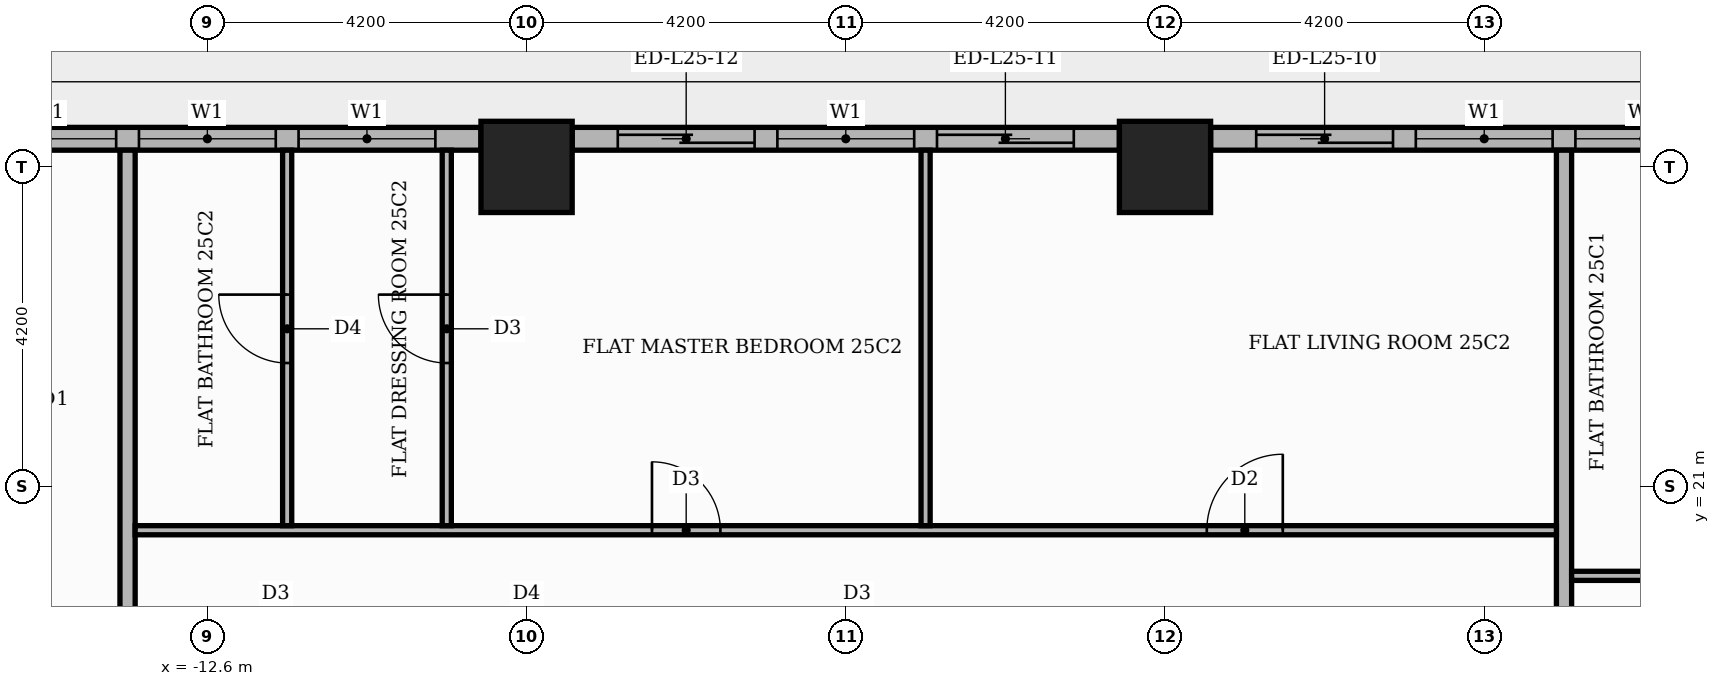
"""IFC4 building model, lengths in metres.
Left out: names, types, materials, properties, quantities, classifications, styles, units other than length and angle.
Written with IfcOpenShell. Run it as: python <this file> out.ifc"""

import sys

from ifc_helpers import new_model, si_unit, direction, frame, frame_2d, origin, origin_2d, place, context, subcontext, project, spatial, rectangle, extrude, element, fill, save


model = new_model("IFC4")
c1 = context("Model", 3, precision=1e-05, world=origin(), true_north=direction((0.0, 1.0)))
c2 = subcontext(c1, "Body", "Model", "MODEL_VIEW")
j1 = project(units=[si_unit("LENGTHUNIT", "METRE"), si_unit("PLANEANGLEUNIT", "RADIAN")], contexts=[c1])
p1 = place(None, origin())
s1 = spatial("IfcSite", under=j1, at=p1, CompositionType="ELEMENT")
p2 = place(p1, origin())
s2 = spatial("IfcBuilding", under=s1, at=p2, CompositionType="ELEMENT")
p3 = place(p2, frame((0.0, 0.0, 106.5)))
s3 = spatial("IfcBuildingStorey", under=s2, at=p3, CompositionType="ELEMENT", Elevation=106.5)
for number, where, z_axis, x_axis in (
    (1, (0.0, 25.2, 0.0), (0.0, 0.0, 1.0), (1.0, 0.0, 0.0)),
    (2, (-8.4, 25.2, 0.0), (0.0, 0.0, 1.0), (1.0, 0.0, 0.0)),
):
    element("IfcColumn", number, at=place(p3, frame(where, z_axis=z_axis, x_axis=x_axis)), inside=s3, PredefinedType="COLUMN", context=c2, shape_type="SweptSolid", body=[
        extrude(rectangle(XDim=1.2, YDim=1.2, at=origin_2d()), origin(), (0.0, 0.0, 1.0), 3.9),
    ])
p4 = place(p3, frame((7.8, 25.57, 0.0), z_axis=(0.0, 0.0, 1.0), x_axis=(-1.0, 0.0, 0.0)))
e3 = element("IfcWall", 3, at=p4, inside=s3, PredefinedType="STANDARD", context=c2, shape_type="SweptSolid", body=[
    extrude(rectangle(XDim=7.2, YDim=0.3, at=frame_2d((3.6, 0.0))), origin(), (0.0, 0.0, 1.0), 3.48),
])
p5 = place(p4, frame((0.6, 0.0, 0.9)))
e4 = element("IfcOpeningElement", 4, at=p5, cuts=e3, PredefinedType="OPENING", context=c2, shape_type="SweptSolid", body=[
    extrude(rectangle(XDim=1.8, YDim=2.1, at=frame_2d((0.9, 1.05))), frame((0.0, 0.16, 0.0), z_axis=(0.0, -1.0, 0.0), x_axis=(1.0, 0.0, 0.0)), (0.0, 0.0, 1.0), 0.32),
])
p6 = place(p4, frame((2.7, 0.0, 0.9)))
e5 = element("IfcOpeningElement", 5, at=p6, cuts=e3, PredefinedType="OPENING", context=c2, shape_type="SweptSolid", body=[
    extrude(rectangle(XDim=1.8, YDim=2.1, at=frame_2d((0.9, 1.05))), frame((0.0, 0.16, 0.0), z_axis=(0.0, -1.0, 0.0), x_axis=(1.0, 0.0, 0.0)), (0.0, 0.0, 1.0), 0.32),
])
p7 = place(p4, frame((4.8, 0.0, 0.0)))
e6 = element("IfcOpeningElement", 6, at=p7, cuts=e3, PredefinedType="OPENING", context=c2, shape_type="SweptSolid", body=[
    extrude(rectangle(XDim=1.8, YDim=2.4, at=frame_2d((0.9, 1.2))), frame((0.0, 0.16, 0.0), z_axis=(0.0, -1.0, 0.0), x_axis=(1.0, 0.0, 0.0)), (0.0, 0.0, 1.0), 0.32),
])
p8 = place(p3, frame((-0.6, 25.57, 0.0), z_axis=(0.0, 0.0, 1.0), x_axis=(-1.0, 0.0, 0.0)))
e7 = element("IfcWall", 7, at=p8, inside=s3, PredefinedType="STANDARD", context=c2, shape_type="SweptSolid", body=[
    extrude(rectangle(XDim=7.2, YDim=0.3, at=frame_2d((3.6, 0.0))), origin(), (0.0, 0.0, 1.0), 3.48),
])
p9 = place(p8, frame((0.6, 0.0, 0.0)))
e8 = element("IfcOpeningElement", 8, at=p9, cuts=e7, PredefinedType="OPENING", context=c2, shape_type="SweptSolid", body=[
    extrude(rectangle(XDim=1.8, YDim=2.4, at=frame_2d((0.9, 1.2))), frame((0.0, 0.16, 0.0), z_axis=(0.0, -1.0, 0.0), x_axis=(1.0, 0.0, 0.0)), (0.0, 0.0, 1.0), 0.32),
])
p10 = place(p8, frame((2.7, 0.0, 0.9)))
e9 = element("IfcOpeningElement", 9, at=p10, cuts=e7, PredefinedType="OPENING", context=c2, shape_type="SweptSolid", body=[
    extrude(rectangle(XDim=1.8, YDim=2.1, at=frame_2d((0.9, 1.05))), frame((0.0, 0.16, 0.0), z_axis=(0.0, -1.0, 0.0), x_axis=(1.0, 0.0, 0.0)), (0.0, 0.0, 1.0), 0.32),
])
p11 = place(p8, frame((4.8, 0.0, 0.0)))
e10 = element("IfcOpeningElement", 10, at=p11, cuts=e7, PredefinedType="OPENING", context=c2, shape_type="SweptSolid", body=[
    extrude(rectangle(XDim=1.8, YDim=2.4, at=frame_2d((0.9, 1.2))), frame((0.0, 0.16, 0.0), z_axis=(0.0, -1.0, 0.0), x_axis=(1.0, 0.0, 0.0)), (0.0, 0.0, 1.0), 0.32),
])
p12 = place(p3, frame((-9.0, 25.57, 0.0), z_axis=(0.0, 0.0, 1.0), x_axis=(-1.0, 0.0, 0.0)))
e11 = element("IfcWall", 11, at=p12, inside=s3, PredefinedType="STANDARD", context=c2, shape_type="SweptSolid", body=[
    extrude(rectangle(XDim=7.2, YDim=0.3, at=frame_2d((3.6, 0.0))), origin(), (0.0, 0.0, 1.0), 3.48),
])
p13 = place(p12, frame((0.6, 0.0, 0.9)))
e12 = element("IfcOpeningElement", 12, at=p13, cuts=e11, PredefinedType="OPENING", context=c2, shape_type="SweptSolid", body=[
    extrude(rectangle(XDim=1.8, YDim=2.1, at=frame_2d((0.9, 1.05))), frame((0.0, 0.16, 0.0), z_axis=(0.0, -1.0, 0.0), x_axis=(1.0, 0.0, 0.0)), (0.0, 0.0, 1.0), 0.32),
])
p14 = place(p12, frame((2.7, 0.0, 0.9)))
e13 = element("IfcOpeningElement", 13, at=p14, cuts=e11, PredefinedType="OPENING", context=c2, shape_type="SweptSolid", body=[
    extrude(rectangle(XDim=1.8, YDim=2.1, at=frame_2d((0.9, 1.05))), frame((0.0, 0.16, 0.0), z_axis=(0.0, -1.0, 0.0), x_axis=(1.0, 0.0, 0.0)), (0.0, 0.0, 1.0), 0.32),
])
p15 = place(p12, frame((4.8, 0.0, 0.9)))
e14 = element("IfcOpeningElement", 14, at=p15, cuts=e11, PredefinedType="OPENING", context=c2, shape_type="SweptSolid", body=[
    extrude(rectangle(XDim=1.8, YDim=2.1, at=frame_2d((0.9, 1.05))), frame((0.0, 0.16, 0.0), z_axis=(0.0, -1.0, 0.0), x_axis=(1.0, 0.0, 0.0)), (0.0, 0.0, 1.0), 0.32),
])
for number, where, z_axis, x_axis in (
    (15, (-13.65, 13.75, 0.0), (0.0, 0.0, 1.0), (0.0, 1.0, 0.0)),
    (16, (5.25, 13.75, 0.0), (0.0, 0.0, 1.0), (0.0, 1.0, 0.0)),
):
    element("IfcWall", number, at=place(p3, frame(where, z_axis=z_axis, x_axis=x_axis)), inside=s3, PredefinedType="PARTITIONING", context=c2, shape_type="SweptSolid", body=[
        extrude(rectangle(XDim=11.67, YDim=0.2, at=frame_2d((5.835, 0.0))), origin(), (0.0, 0.0, 1.0), 3.48),
    ])
p16 = place(p3, frame((5.35, 19.82, 0.0), z_axis=(0.0, 0.0, 1.0), x_axis=(1.0, 0.0, 0.0)))
e17 = element("IfcWall", 17, at=p16, inside=s3, PredefinedType="PARTITIONING", context=c2, shape_type="SweptSolid", body=[
    extrude(rectangle(XDim=12.05, YDim=0.12, at=frame_2d((6.025, 0.0))), origin(), (0.0, 0.0, 1.0), 3.48),
])
p17 = place(p16, frame((8.85, 0.0, 0.0)))
e18 = element("IfcOpeningElement", 18, at=p17, cuts=e17, PredefinedType="OPENING", context=c2, shape_type="SweptSolid", body=[
    extrude(rectangle(XDim=1.0, YDim=2.1, at=frame_2d((0.5, 1.05))), frame((0.0, 0.07, 0.0), z_axis=(0.0, -1.0, 0.0), x_axis=(1.0, 0.0, 0.0)), (0.0, 0.0, 1.0), 0.14),
])
p18 = place(p16, frame((5.75, 0.0, 0.0)))
e19 = element("IfcOpeningElement", 19, at=p18, cuts=e17, PredefinedType="OPENING", context=c2, shape_type="SweptSolid", body=[
    extrude(rectangle(XDim=0.9, YDim=2.1, at=frame_2d((0.45, 1.05))), frame((0.0, 0.07, 0.0), z_axis=(0.0, -1.0, 0.0), x_axis=(1.0, 0.0, 0.0)), (0.0, 0.0, 1.0), 0.14),
])
p19 = place(p3, frame((-13.55, 20.42, 0.0), z_axis=(0.0, 0.0, 1.0), x_axis=(1.0, 0.0, 0.0)))
e20 = element("IfcWall", 20, at=p19, inside=s3, PredefinedType="PARTITIONING", context=c2, shape_type="SweptSolid", body=[
    extrude(rectangle(XDim=18.7, YDim=0.12, at=frame_2d((9.35, 0.0))), origin(), (0.0, 0.0, 1.0), 3.48),
])
p20 = place(p19, frame((14.1, 0.0, 0.0)))
e21 = element("IfcOpeningElement", 21, at=p20, cuts=e20, PredefinedType="OPENING", context=c2, shape_type="SweptSolid", body=[
    extrude(rectangle(XDim=1.0, YDim=2.1, at=frame_2d((0.5, 1.05))), frame((0.0, 0.07, 0.0), z_axis=(0.0, -1.0, 0.0), x_axis=(1.0, 0.0, 0.0)), (0.0, 0.0, 1.0), 0.14),
])
p21 = place(p19, frame((6.8, 0.0, 0.0)))
e22 = element("IfcOpeningElement", 22, at=p21, cuts=e20, PredefinedType="OPENING", context=c2, shape_type="SweptSolid", body=[
    extrude(rectangle(XDim=0.9, YDim=2.1, at=frame_2d((0.45, 1.05))), frame((0.0, 0.07, 0.0), z_axis=(0.0, -1.0, 0.0), x_axis=(1.0, 0.0, 0.0)), (0.0, 0.0, 1.0), 0.14),
])
p22 = place(p3, frame((-11.55, 20.48, 0.0), z_axis=(0.0, 0.0, 1.0), x_axis=(0.0, 1.0, 0.0)))
e23 = element("IfcWall", 23, at=p22, inside=s3, PredefinedType="PARTITIONING", context=c2, shape_type="SweptSolid", body=[
    extrude(rectangle(XDim=4.94, YDim=0.12, at=frame_2d((2.47, 0.0))), origin(), (0.0, 0.0, 1.0), 3.48),
])
p23 = place(p22, frame((2.14, 0.0, 0.0)))
e24 = element("IfcOpeningElement", 24, at=p23, cuts=e23, PredefinedType="OPENING", context=c2, shape_type="SweptSolid", body=[
    extrude(rectangle(XDim=0.9, YDim=2.1, at=frame_2d((0.45, 1.05))), frame((0.0, 0.07, 0.0), z_axis=(0.0, -1.0, 0.0), x_axis=(1.0, 0.0, 0.0)), (0.0, 0.0, 1.0), 0.14),
])
p24 = place(p3, frame((-9.45, 20.48, 0.0), z_axis=(0.0, 0.0, 1.0), x_axis=(0.0, 1.0, 0.0)))
e25 = element("IfcWall", 25, at=p24, inside=s3, PredefinedType="PARTITIONING", context=c2, shape_type="SweptSolid", body=[
    extrude(rectangle(XDim=4.94, YDim=0.12, at=frame_2d((2.47, 0.0))), origin(), (0.0, 0.0, 1.0), 3.48),
])
p25 = place(p24, frame((2.14, 0.0, 0.0)))
e26 = element("IfcOpeningElement", 26, at=p25, cuts=e25, PredefinedType="OPENING", context=c2, shape_type="SweptSolid", body=[
    extrude(rectangle(XDim=0.9, YDim=2.1, at=frame_2d((0.45, 1.05))), frame((0.0, 0.07, 0.0), z_axis=(0.0, -1.0, 0.0), x_axis=(1.0, 0.0, 0.0)), (0.0, 0.0, 1.0), 0.14),
])
p26 = place(p3, frame((-3.15, 20.48, 0.0), z_axis=(0.0, 0.0, 1.0), x_axis=(0.0, 1.0, 0.0)))
e27 = element("IfcWall", 27, at=p26, inside=s3, PredefinedType="PARTITIONING", context=c2, shape_type="SweptSolid", body=[
    extrude(rectangle(XDim=4.94, YDim=0.12, at=frame_2d((2.47, 0.0))), origin(), (0.0, 0.0, 1.0), 3.48),
])
p27 = place(p5, origin())
e28 = element("IfcWindow", 28, at=p27, inside=s3, PartitioningType="SINGLE_PANEL", PredefinedType="WINDOW", context=c2, shape_type="SweptSolid", body=[
    extrude(rectangle(XDim=1.8, YDim=2.1, at=frame_2d((0.9, 1.05))), frame((0.0, 0.03, 0.0), z_axis=(0.0, -1.0, 0.0), x_axis=(1.0, 0.0, 0.0)), (0.0, 0.0, 1.0), 0.06),
])
fill(e4, e28)
p28 = place(p6, origin())
e29 = element("IfcWindow", 29, at=p28, inside=s3, PartitioningType="SINGLE_PANEL", PredefinedType="WINDOW", context=c2, shape_type="SweptSolid", body=[
    extrude(rectangle(XDim=1.8, YDim=2.1, at=frame_2d((0.9, 1.05))), frame((0.0, 0.03, 0.0), z_axis=(0.0, -1.0, 0.0), x_axis=(1.0, 0.0, 0.0)), (0.0, 0.0, 1.0), 0.06),
])
fill(e5, e29)
p29 = place(p7, origin())
e30 = element("IfcDoor", 30, at=p29, inside=s3, OperationType="SLIDING_TO_RIGHT", PredefinedType="DOOR", context=c2, shape_type="SweptSolid", body=[
    extrude(rectangle(XDim=1.8, YDim=2.4, at=frame_2d((0.9, 1.2))), frame((0.0, 0.025, 0.0), z_axis=(0.0, -1.0, 0.0), x_axis=(1.0, 0.0, 0.0)), (0.0, 0.0, 1.0), 0.05),
])
fill(e6, e30)
p30 = place(p9, origin())
e31 = element("IfcDoor", 31, at=p30, inside=s3, OperationType="SLIDING_TO_LEFT", PredefinedType="DOOR", context=c2, shape_type="SweptSolid", body=[
    extrude(rectangle(XDim=1.8, YDim=2.4, at=frame_2d((0.9, 1.2))), frame((0.0, 0.025, 0.0), z_axis=(0.0, -1.0, 0.0), x_axis=(1.0, 0.0, 0.0)), (0.0, 0.0, 1.0), 0.05),
])
fill(e8, e31)
p31 = place(p10, origin())
e32 = element("IfcWindow", 32, at=p31, inside=s3, PartitioningType="SINGLE_PANEL", PredefinedType="WINDOW", context=c2, shape_type="SweptSolid", body=[
    extrude(rectangle(XDim=1.8, YDim=2.1, at=frame_2d((0.9, 1.05))), frame((0.0, 0.03, 0.0), z_axis=(0.0, -1.0, 0.0), x_axis=(1.0, 0.0, 0.0)), (0.0, 0.0, 1.0), 0.06),
])
fill(e9, e32)
p32 = place(p11, origin())
e33 = element("IfcDoor", 33, at=p32, inside=s3, OperationType="SLIDING_TO_RIGHT", PredefinedType="DOOR", context=c2, shape_type="SweptSolid", body=[
    extrude(rectangle(XDim=1.8, YDim=2.4, at=frame_2d((0.9, 1.2))), frame((0.0, 0.025, 0.0), z_axis=(0.0, -1.0, 0.0), x_axis=(1.0, 0.0, 0.0)), (0.0, 0.0, 1.0), 0.05),
])
fill(e10, e33)
p33 = place(p13, origin())
e34 = element("IfcWindow", 34, at=p33, inside=s3, PartitioningType="SINGLE_PANEL", PredefinedType="WINDOW", context=c2, shape_type="SweptSolid", body=[
    extrude(rectangle(XDim=1.8, YDim=2.1, at=frame_2d((0.9, 1.05))), frame((0.0, 0.03, 0.0), z_axis=(0.0, -1.0, 0.0), x_axis=(1.0, 0.0, 0.0)), (0.0, 0.0, 1.0), 0.06),
])
fill(e12, e34)
p34 = place(p14, origin())
e35 = element("IfcWindow", 35, at=p34, inside=s3, PartitioningType="SINGLE_PANEL", PredefinedType="WINDOW", context=c2, shape_type="SweptSolid", body=[
    extrude(rectangle(XDim=1.8, YDim=2.1, at=frame_2d((0.9, 1.05))), frame((0.0, 0.03, 0.0), z_axis=(0.0, -1.0, 0.0), x_axis=(1.0, 0.0, 0.0)), (0.0, 0.0, 1.0), 0.06),
])
fill(e13, e35)
p35 = place(p15, origin())
e36 = element("IfcWindow", 36, at=p35, inside=s3, PartitioningType="SINGLE_PANEL", PredefinedType="WINDOW", context=c2, shape_type="SweptSolid", body=[
    extrude(rectangle(XDim=1.8, YDim=2.1, at=frame_2d((0.9, 1.05))), frame((0.0, 0.03, 0.0), z_axis=(0.0, -1.0, 0.0), x_axis=(1.0, 0.0, 0.0)), (0.0, 0.0, 1.0), 0.06),
])
fill(e14, e36)
p36 = place(p20, origin())
e37 = element("IfcDoor", 37, at=p36, inside=s3, OperationType="SINGLE_SWING_RIGHT", PredefinedType="DOOR", context=c2, shape_type="SweptSolid", body=[
    extrude(rectangle(XDim=1.0, YDim=2.1, at=frame_2d((0.5, 1.05))), frame((0.0, 0.025, 0.0), z_axis=(0.0, -1.0, 0.0), x_axis=(1.0, 0.0, 0.0)), (0.0, 0.0, 1.0), 0.05),
])
fill(e21, e37)
p37 = place(p21, origin())
e38 = element("IfcDoor", 38, at=p37, inside=s3, OperationType="SINGLE_SWING_LEFT", PredefinedType="DOOR", context=c2, shape_type="SweptSolid", body=[
    extrude(rectangle(XDim=0.9, YDim=2.1, at=frame_2d((0.45, 1.05))), frame((0.0, 0.025, 0.0), z_axis=(0.0, -1.0, 0.0), x_axis=(1.0, 0.0, 0.0)), (0.0, 0.0, 1.0), 0.05),
])
fill(e22, e38)
p38 = place(p25, origin())
e39 = element("IfcDoor", 39, at=p38, inside=s3, OperationType="SINGLE_SWING_RIGHT", PredefinedType="DOOR", context=c2, shape_type="SweptSolid", body=[
    extrude(rectangle(XDim=0.9, YDim=2.1, at=frame_2d((0.45, 1.05))), frame((0.0, 0.025, 0.0), z_axis=(0.0, -1.0, 0.0), x_axis=(1.0, 0.0, 0.0)), (0.0, 0.0, 1.0), 0.05),
])
fill(e26, e39)
p39 = place(p23, origin())
e40 = element("IfcDoor", 40, at=p39, inside=s3, OperationType="SINGLE_SWING_RIGHT", PredefinedType="DOOR", context=c2, shape_type="SweptSolid", body=[
    extrude(rectangle(XDim=0.9, YDim=2.1, at=frame_2d((0.45, 1.05))), frame((0.0, 0.025, 0.0), z_axis=(0.0, -1.0, 0.0), x_axis=(1.0, 0.0, 0.0)), (0.0, 0.0, 1.0), 0.05),
])
fill(e24, e40)
save(model, sys.argv[1])
